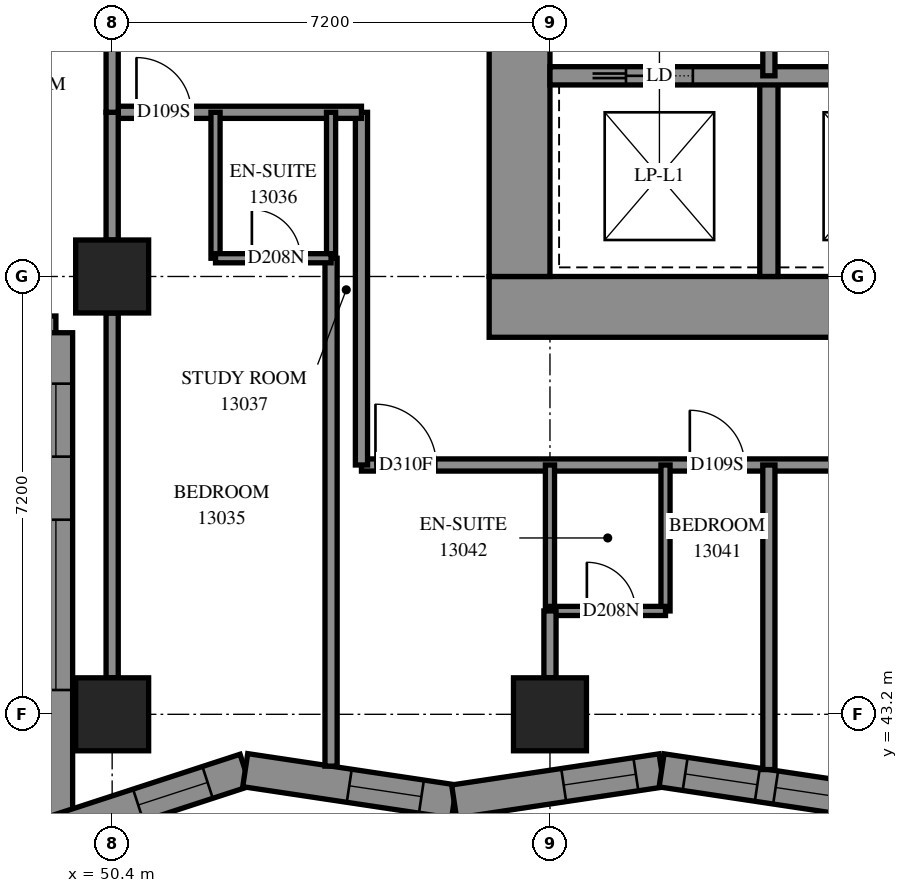
"""IFC4 building model, lengths in metres.
Left out: names, types, materials, properties, quantities, classifications, styles, units other than length and angle.
Written with IfcOpenShell. Run it as: python <this file> out.ifc"""

import sys

from ifc_helpers import new_model, si_unit, direction, frame, frame_2d, origin, origin_2d, place, context, subcontext, project, spatial, polyline, rectangle, outline, extrude, element, fill, save


model = new_model("IFC4")
c1 = context("Model", 3, precision=1e-05, world=origin(), true_north=direction((0.0, 1.0)))
c2 = subcontext(c1, "Body", "Model", "MODEL_VIEW")
j1 = project(units=[si_unit("LENGTHUNIT", "METRE"), si_unit("PLANEANGLEUNIT", "RADIAN")], contexts=[c1])
p1 = place(None, origin())
s1 = spatial("IfcSite", under=j1, at=p1, CompositionType="ELEMENT")
p2 = place(p1, origin())
s2 = spatial("IfcBuilding", under=s1, at=p2, CompositionType="ELEMENT")
p3 = place(p2, frame((0.0, 0.0, 50.8)))
s3 = spatial("IfcBuildingStorey", under=s2, at=p3, CompositionType="ELEMENT", Elevation=50.8)
for number, where, z_axis, x_axis in (
    (1, (50.4, 43.2, 0.0), (0.0, 0.0, 1.0), (1.0, 0.0, 0.0)),
    (2, (50.4, 50.4, 0.0), (0.0, 0.0, 1.0), (1.0, 0.0, 0.0)),
    (3, (57.6, 43.2, 0.0), (0.0, 0.0, 1.0), (1.0, 0.0, 0.0)),
):
    element("IfcColumn", number, at=place(p3, frame(where, z_axis=z_axis, x_axis=x_axis)), inside=s3, PredefinedType="COLUMN", context=c2, shape_type="SweptSolid", body=[
        extrude(rectangle(XDim=1.2, YDim=1.2, at=origin_2d()), origin(), (0.0, 0.0, 1.0), 3.1),
    ])
p4 = place(p3, frame((56.6, 49.9, -0.3), z_axis=(0.0, 0.0, 1.0), x_axis=(1.0, 0.0, 0.0)))
e4 = element("IfcWall", 4, at=p4, inside=s3, PredefinedType="SHEAR", context=c2, shape_type="SweptSolid", body=[
    extrude(rectangle(XDim=16.4, YDim=1.0, at=frame_2d((8.2, 0.0))), origin(), (0.0, 0.0, 1.0), 2.7),
])
p5 = place(p3, frame((57.1, 50.4, -0.3), z_axis=(0.0, 0.0, 1.0), x_axis=(0.0, 1.0, 0.0)))
e5 = element("IfcWall", 5, at=p5, inside=s3, PredefinedType="SHEAR", context=c2, shape_type="SweptSolid", body=[
    extrude(rectangle(XDim=14.4, YDim=1.0, at=frame_2d((7.2, 0.0))), origin(), (0.0, 0.0, 1.0), 2.7),
])
p6 = place(p5, frame((4.55, 0.0, 0.3)))
e6 = element("IfcOpeningElement", 6, at=p6, cuts=e5, PredefinedType="OPENING", context=c2, shape_type="SweptSolid", body=[
    extrude(rectangle(XDim=1.1, YDim=2.1, at=frame_2d((0.55, 1.05))), frame((0.0, 0.51, 0.0), z_axis=(0.0, -1.0, 0.0), x_axis=(1.0, 0.0, 0.0)), (0.0, 0.0, 1.0), 1.02),
])
p7 = place(p5, frame((11.35, 0.0, 0.3)))
e7 = element("IfcOpeningElement", 7, at=p7, cuts=e5, PredefinedType="OPENING", context=c2, shape_type="SweptSolid", body=[
    extrude(rectangle(XDim=1.1, YDim=2.1, at=frame_2d((0.55, 1.05))), frame((0.0, 0.51, 0.0), z_axis=(0.0, -1.0, 0.0), x_axis=(1.0, 0.0, 0.0)), (0.0, 0.0, 1.0), 1.02),
])
p8 = place(p3, frame((61.2, 50.4, 0.0), z_axis=(0.0, 0.0, 1.0), x_axis=(0.0, 1.0, 0.0)))
e8 = element("IfcWall", 8, at=p8, inside=s3, PredefinedType="SOLIDWALL", context=c2, shape_type="SweptSolid", body=[
    extrude(rectangle(XDim=3.3, YDim=0.3, at=frame_2d((1.65, 0.0))), origin(), (0.0, 0.0, 1.0), 3.1),
])
p9 = place(p3, frame((57.6, 53.7, 0.0), z_axis=(0.0, 0.0, 1.0), x_axis=(1.0, 0.0, 0.0)))
e9 = element("IfcWall", 9, at=p9, inside=s3, PredefinedType="SOLIDWALL", context=c2, shape_type="SweptSolid", body=[
    extrude(rectangle(XDim=14.4, YDim=0.3, at=frame_2d((7.2, 0.0))), origin(), (0.0, 0.0, 1.0), 3.1),
])
p10 = place(p9, frame((1.25, 0.0, 0.0)))
e10 = element("IfcOpeningElement", 10, at=p10, cuts=e9, PredefinedType="OPENING", context=c2, shape_type="SweptSolid", body=[
    extrude(rectangle(XDim=1.1, YDim=2.1, at=frame_2d((0.55, 1.05))), frame((0.0, 0.16, 0.0), z_axis=(0.0, -1.0, 0.0), x_axis=(1.0, 0.0, 0.0)), (0.0, 0.0, 1.0), 0.32),
])
p11 = place(p9, frame((4.85, 0.0, 0.0)))
e11 = element("IfcOpeningElement", 11, at=p11, cuts=e9, PredefinedType="OPENING", context=c2, shape_type="SweptSolid", body=[
    extrude(rectangle(XDim=1.1, YDim=2.1, at=frame_2d((0.55, 1.05))), frame((0.0, 0.16, 0.0), z_axis=(0.0, -1.0, 0.0), x_axis=(1.0, 0.0, 0.0)), (0.0, 0.0, 1.0), 0.32),
])
p12 = place(p9, frame((8.45, 0.0, 0.0)))
e12 = element("IfcOpeningElement", 12, at=p12, cuts=e9, PredefinedType="OPENING", context=c2, shape_type="SweptSolid", body=[
    extrude(rectangle(XDim=1.1, YDim=2.1, at=frame_2d((0.55, 1.05))), frame((0.0, 0.16, 0.0), z_axis=(0.0, -1.0, 0.0), x_axis=(1.0, 0.0, 0.0)), (0.0, 0.0, 1.0), 0.32),
])
p13 = place(p9, frame((12.05, 0.0, 0.0)))
e13 = element("IfcOpeningElement", 13, at=p13, cuts=e9, PredefinedType="OPENING", context=c2, shape_type="SweptSolid", body=[
    extrude(rectangle(XDim=1.1, YDim=2.1, at=frame_2d((0.55, 1.05))), frame((0.0, 0.16, 0.0), z_axis=(0.0, -1.0, 0.0), x_axis=(1.0, 0.0, 0.0)), (0.0, 0.0, 1.0), 0.32),
])
p14 = place(p3, frame((42.275, 49.475, 0.0), z_axis=(0.0, 0.0, 1.0), x_axis=(1.0, 0.0, 0.0)))
e14 = element("IfcWall", 14, at=p14, inside=s3, PredefinedType="SOLIDWALL", context=c2, shape_type="SweptSolid", body=[
    extrude(outline(polyline([(-0.275, -0.275), (6.925, -0.275), (7.475, 0.275), (0.275, 0.275), (-0.275, -0.275)])), origin(), (0.0, 0.0, 1.0), 3.1),
])
p15 = place(p14, frame((1.325, 0.0, 0.5)))
e15 = element("IfcOpeningElement", 15, at=p15, cuts=e14, PredefinedType="OPENING", context=c2, shape_type="SweptSolid", body=[
    extrude(rectangle(XDim=2.8, YDim=2.45, at=frame_2d((1.4, 1.225))), frame((0.0, 0.285, 0.0), z_axis=(0.0, -1.0, 0.0), x_axis=(1.0, 0.0, 0.0)), (0.0, 0.0, 1.0), 0.57),
])
p16 = place(p14, frame((5.162, 0.0, 0.5)))
e16 = element("IfcOpeningElement", 16, at=p16, cuts=e14, PredefinedType="OPENING", context=c2, shape_type="SweptSolid", body=[
    extrude(rectangle(XDim=1.2, YDim=2.45, at=frame_2d((0.6, 1.225))), frame((0.0, 0.285, 0.0), z_axis=(0.0, -1.0, 0.0), x_axis=(1.0, 0.0, 0.0)), (0.0, 0.0, 1.0), 0.57),
])
p17 = place(p3, frame((49.475, 49.475, 0.0), z_axis=(0.0, 0.0, 1.0), x_axis=(0.0, -1.0, 0.0)))
e17 = element("IfcWall", 17, at=p17, inside=s3, PredefinedType="SOLIDWALL", context=c2, shape_type="SweptSolid", body=[
    extrude(outline(polyline([(0.275, -0.275), (8.587, -0.275), (7.829, 0.275), (-0.275, 0.275), (0.275, -0.275)])), origin(), (0.0, 0.0, 1.0), 3.1),
])
p18 = place(p17, frame((3.075, 0.0, 0.5)))
e18 = element("IfcOpeningElement", 18, at=p18, cuts=e17, PredefinedType="OPENING", context=c2, shape_type="SweptSolid", body=[
    extrude(rectangle(XDim=2.8, YDim=2.45, at=frame_2d((1.4, 1.225))), frame((0.0, 0.285, 0.0), z_axis=(0.0, -1.0, 0.0), x_axis=(1.0, 0.0, 0.0)), (0.0, 0.0, 1.0), 0.57),
])
p19 = place(p17, frame((0.838, 0.0, 0.5)))
e19 = element("IfcOpeningElement", 19, at=p19, cuts=e17, PredefinedType="OPENING", context=c2, shape_type="SweptSolid", body=[
    extrude(rectangle(XDim=1.2, YDim=2.45, at=frame_2d((0.6, 1.225))), frame((0.0, 0.285, 0.0), z_axis=(0.0, -1.0, 0.0), x_axis=(1.0, 0.0, 0.0)), (0.0, 0.0, 1.0), 0.57),
])
p20 = place(p3, frame((49.475, 41.267, 0.0), z_axis=(0.0, 0.0, 1.0), x_axis=(0.9507812873, 0.3098627821, 0.0)))
e20 = element("IfcWall", 20, at=p20, inside=s3, PredefinedType="SOLIDWALL", context=c2, shape_type="SweptSolid", body=[
    extrude(outline(polyline([(-0.379, -0.275), (3.21, -0.275), (3.34, 0.275), (0.379, 0.275), (-0.379, -0.275)])), origin(), (0.0, 0.0, 1.0), 3.1),
])
p21 = place(p20, frame((1.424, 0.0, 0.5)))
e21 = element("IfcOpeningElement", 21, at=p21, cuts=e20, PredefinedType="OPENING", context=c2, shape_type="SweptSolid", body=[
    extrude(rectangle(XDim=1.2, YDim=2.45, at=frame_2d((0.6, 1.225))), frame((0.0, 0.285, 0.0), z_axis=(0.0, -1.0, 0.0), x_axis=(1.0, 0.0, 0.0)), (0.0, 0.0, 1.0), 0.57),
])
p22 = place(p3, frame((52.589, 42.282, 0.0), z_axis=(0.0, 0.0, 1.0), x_axis=(0.9889276939, -0.1483981679, 0.0)))
e22 = element("IfcWall", 22, at=p22, inside=s3, PredefinedType="SOLIDWALL", context=c2, shape_type="SweptSolid", body=[
    extrude(outline(polyline([(0.065, -0.275), (3.515, -0.275), (3.433, 0.275), (-0.065, 0.275), (0.065, -0.275)])), origin(), (0.0, 0.0, 1.0), 3.1),
])
p23 = place(p22, frame((1.73, 0.0, 0.5)))
e23 = element("IfcOpeningElement", 23, at=p23, cuts=e22, PredefinedType="OPENING", context=c2, shape_type="SweptSolid", body=[
    extrude(rectangle(XDim=1.2, YDim=2.45, at=frame_2d((0.6, 1.225))), frame((0.0, 0.285, 0.0), z_axis=(0.0, -1.0, 0.0), x_axis=(1.0, 0.0, 0.0)), (0.0, 0.0, 1.0), 0.57),
])
p24 = place(p3, frame((56.024, 41.766, 0.0), z_axis=(0.0, 0.0, 1.0), x_axis=(0.9889272091, 0.1484013984, 0.0)))
e24 = element("IfcWall", 24, at=p24, inside=s3, PredefinedType="SOLIDWALL", context=c2, shape_type="SweptSolid", body=[
    extrude(outline(polyline([(-0.041, -0.275), (3.409, -0.275), (3.491, 0.275), (0.041, 0.275), (-0.041, -0.275)])), origin(), (0.0, 0.0, 1.0), 3.1),
])
p25 = place(p24, frame((1.822, 0.0, 0.5)))
e25 = element("IfcOpeningElement", 25, at=p25, cuts=e24, PredefinedType="OPENING", context=c2, shape_type="SweptSolid", body=[
    extrude(rectangle(XDim=1.2, YDim=2.45, at=frame_2d((0.6, 1.225))), frame((0.0, 0.285, 0.0), z_axis=(0.0, -1.0, 0.0), x_axis=(1.0, 0.0, 0.0)), (0.0, 0.0, 1.0), 0.57),
])
p26 = place(p3, frame((59.436, 42.278, 0.0), z_axis=(0.0, 0.0, 1.0), x_axis=(0.9889272091, -0.1484013984, 0.0)))
e26 = element("IfcWall", 26, at=p26, inside=s3, PredefinedType="SOLIDWALL", context=c2, shape_type="SweptSolid", body=[
    extrude(outline(polyline([(0.041, -0.275), (3.491, -0.275), (3.409, 0.275), (-0.041, 0.275), (0.041, -0.275)])), origin(), (0.0, 0.0, 1.0), 3.1),
])
p27 = place(p26, frame((0.392, 0.0, 0.5)))
e27 = element("IfcOpeningElement", 27, at=p27, cuts=e26, PredefinedType="OPENING", context=c2, shape_type="SweptSolid", body=[
    extrude(rectangle(XDim=1.2, YDim=2.45, at=frame_2d((0.6, 1.225))), frame((0.0, 0.285, 0.0), z_axis=(0.0, -1.0, 0.0), x_axis=(1.0, 0.0, 0.0)), (0.0, 0.0, 1.0), 0.57),
])
p28 = place(p26, frame((1.896, 0.0, 0.5)))
e28 = element("IfcOpeningElement", 28, at=p28, cuts=e26, PredefinedType="OPENING", context=c2, shape_type="SweptSolid", body=[
    extrude(rectangle(XDim=1.2, YDim=2.45, at=frame_2d((0.6, 1.225))), frame((0.0, 0.285, 0.0), z_axis=(0.0, -1.0, 0.0), x_axis=(1.0, 0.0, 0.0)), (0.0, 0.0, 1.0), 0.57),
])
p29 = place(p3, frame((61.2, 53.7, 0.0), z_axis=(0.0, 0.0, 1.0), x_axis=(0.0, 1.0, 0.0)))
e29 = element("IfcWall", 29, at=p29, inside=s3, PredefinedType="PARTITIONING", context=c2, shape_type="SweptSolid", body=[
    extrude(rectangle(XDim=3.6, YDim=0.2, at=frame_2d((1.8, 0.0))), origin(), (0.0, 0.0, 1.0), 3.1),
])
p30 = place(p3, frame((54.5, 47.3, 0.0), z_axis=(0.0, 0.0, 1.0), x_axis=(1.0, 0.0, 0.0)))
e30 = element("IfcWall", 30, at=p30, inside=s3, PredefinedType="PARTITIONING", context=c2, shape_type="SweptSolid", body=[
    extrude(rectangle(XDim=19.56, YDim=0.2, at=frame_2d((9.78, 0.0))), origin(), (0.0, 0.0, 1.0), 3.1),
])
p31 = place(p30, frame((0.23, 0.0, 0.0)))
e31 = element("IfcOpeningElement", 31, at=p31, cuts=e30, PredefinedType="OPENING", context=c2, shape_type="SweptSolid", body=[
    extrude(rectangle(XDim=1.0, YDim=2.1, at=frame_2d((0.5, 1.05))), frame((0.0, 0.11, 0.0), z_axis=(0.0, -1.0, 0.0), x_axis=(1.0, 0.0, 0.0)), (0.0, 0.0, 1.0), 0.22),
])
p32 = place(p30, frame((5.4, 0.0, 0.0)))
e32 = element("IfcOpeningElement", 32, at=p32, cuts=e30, PredefinedType="OPENING", context=c2, shape_type="SweptSolid", body=[
    extrude(rectangle(XDim=0.9, YDim=2.1, at=frame_2d((0.45, 1.05))), frame((0.0, 0.11, 0.0), z_axis=(0.0, -1.0, 0.0), x_axis=(1.0, 0.0, 0.0)), (0.0, 0.0, 1.0), 0.22),
])
p33 = place(p30, frame((9.001, 0.0, 0.0)))
e33 = element("IfcOpeningElement", 33, at=p33, cuts=e30, PredefinedType="OPENING", context=c2, shape_type="SweptSolid", body=[
    extrude(rectangle(XDim=0.9, YDim=2.1, at=frame_2d((0.45, 1.05))), frame((0.0, 0.11, 0.0), z_axis=(0.0, -1.0, 0.0), x_axis=(1.0, 0.0, 0.0)), (0.0, 0.0, 1.0), 0.22),
])
p34 = place(p30, frame((14.3, 0.0, 0.0)))
e34 = element("IfcOpeningElement", 34, at=p34, cuts=e30, PredefinedType="OPENING", context=c2, shape_type="SweptSolid", body=[
    extrude(rectangle(XDim=0.9, YDim=2.1, at=frame_2d((0.45, 1.05))), frame((0.0, 0.11, 0.0), z_axis=(0.0, -1.0, 0.0), x_axis=(1.0, 0.0, 0.0)), (0.0, 0.0, 1.0), 0.22),
])
p35 = place(p3, frame((54.0, 42.348, 0.0), z_axis=(0.0, 0.0, 1.0), x_axis=(0.0, 1.0, 0.0)))
e35 = element("IfcWall", 35, at=p35, inside=s3, PredefinedType="PARTITIONING", context=c2, shape_type="SweptSolid", body=[
    extrude(rectangle(XDim=8.352, YDim=0.2, at=frame_2d((4.176, 0.0))), origin(), (0.0, 0.0, 1.0), 3.1),
])
p36 = place(p3, frame((50.4, 43.8, 0.0), z_axis=(0.0, 0.0, 1.0), x_axis=(0.0, 1.0, 0.0)))
e36 = element("IfcWall", 36, at=p36, inside=s3, PredefinedType="PARTITIONING", context=c2, shape_type="SweptSolid", body=[
    extrude(rectangle(XDim=6.0, YDim=0.2, at=frame_2d((3.0, 0.0))), origin(), (0.0, 0.0, 1.0), 2.6),
])
p37 = place(p3, frame((54.5, 47.3, 0.0), z_axis=(0.0, 0.0, 1.0), x_axis=(0.0, 1.0, 0.0)))
e37 = element("IfcWall", 37, at=p37, inside=s3, PredefinedType="PARTITIONING", context=c2, shape_type="SweptSolid", body=[
    extrude(rectangle(XDim=5.8, YDim=0.2, at=frame_2d((2.9, 0.0))), origin(), (0.0, 0.0, 1.0), 3.1),
])
p38 = place(p3, frame((61.2, 42.291, 0.0), z_axis=(0.0, 0.0, 1.0), x_axis=(0.0, 1.0, 0.0)))
e38 = element("IfcWall", 38, at=p38, inside=s3, PredefinedType="PARTITIONING", context=c2, shape_type="SweptSolid", body=[
    extrude(rectangle(XDim=5.009, YDim=0.2, at=frame_2d((2.504, 0.0))), origin(), (0.0, 0.0, 1.0), 3.1),
])
p39 = place(p3, frame((50.4, 53.1, 0.0), z_axis=(0.0, 0.0, 1.0), x_axis=(1.0, 0.0, 0.0)))
e39 = element("IfcWall", 39, at=p39, inside=s3, PredefinedType="PARTITIONING", context=c2, shape_type="SweptSolid", body=[
    extrude(rectangle(XDim=4.1, YDim=0.2, at=frame_2d((2.05, 0.0))), origin(), (0.0, 0.0, 1.0), 3.1),
])
p40 = place(p39, frame((0.4, 0.0, 0.0)))
e40 = element("IfcOpeningElement", 40, at=p40, cuts=e39, PredefinedType="OPENING", context=c2, shape_type="SweptSolid", body=[
    extrude(rectangle(XDim=0.9, YDim=2.1, at=frame_2d((0.45, 1.05))), frame((0.0, 0.11, 0.0), z_axis=(0.0, -1.0, 0.0), x_axis=(1.0, 0.0, 0.0)), (0.0, 0.0, 1.0), 0.22),
])
for number, where, z_axis, x_axis in (
    (41, (52.1, 50.7, 0.0), (0.0, 0.0, 1.0), (0.0, 1.0, 0.0)),
    (42, (54.0, 50.7, 0.0), (0.0, 0.0, 1.0), (0.0, 1.0, 0.0)),
    (43, (59.5, 44.9, 0.0), (0.0, 0.0, 1.0), (0.0, 1.0, 0.0)),
    (44, (57.6, 44.9, 0.0), (0.0, 0.0, 1.0), (0.0, 1.0, 0.0)),
):
    element("IfcWall", number, at=place(p3, frame(where, z_axis=z_axis, x_axis=x_axis)), inside=s3, PredefinedType="PARTITIONING", context=c2, shape_type="SweptSolid", body=[
        extrude(rectangle(XDim=2.4, YDim=0.15, at=frame_2d((1.2, 0.0))), origin(), (0.0, 0.0, 1.0), 3.1),
    ])
p41 = place(p3, frame((50.4, 51.0, 0.0), z_axis=(0.0, 0.0, 1.0), x_axis=(0.0, 1.0, 0.0)))
e45 = element("IfcWall", 45, at=p41, inside=s3, PredefinedType="PARTITIONING", context=c2, shape_type="SweptSolid", body=[
    extrude(rectangle(XDim=2.1, YDim=0.2, at=frame_2d((1.05, 0.0))), origin(), (0.0, 0.0, 1.0), 3.1),
])
p42 = place(p3, frame((52.1, 50.7, 0.0), z_axis=(0.0, 0.0, 1.0), x_axis=(1.0, 0.0, 0.0)))
e46 = element("IfcWall", 46, at=p42, inside=s3, PredefinedType="PARTITIONING", context=c2, shape_type="SweptSolid", body=[
    extrude(rectangle(XDim=1.9, YDim=0.15, at=frame_2d((0.95, 0.0))), origin(), (0.0, 0.0, 1.0), 3.1),
])
p43 = place(p42, frame((0.598, 0.0, 0.0)))
e47 = element("IfcOpeningElement", 47, at=p43, cuts=e46, PredefinedType="OPENING", context=c2, shape_type="SweptSolid", body=[
    extrude(rectangle(XDim=0.8, YDim=2.1, at=frame_2d((0.4, 1.05))), frame((0.0, 0.085, 0.0), z_axis=(0.0, -1.0, 0.0), x_axis=(1.0, 0.0, 0.0)), (0.0, 0.0, 1.0), 0.17),
])
p44 = place(p3, frame((57.6, 44.9, 0.0), z_axis=(0.0, 0.0, 1.0), x_axis=(1.0, 0.0, 0.0)))
e48 = element("IfcWall", 48, at=p44, inside=s3, PredefinedType="PARTITIONING", context=c2, shape_type="SweptSolid", body=[
    extrude(rectangle(XDim=1.9, YDim=0.15, at=frame_2d((0.95, 0.0))), origin(), (0.0, 0.0, 1.0), 3.1),
])
p45 = place(p44, frame((0.607, 0.0, 0.0)))
e49 = element("IfcOpeningElement", 49, at=p45, cuts=e48, PredefinedType="OPENING", context=c2, shape_type="SweptSolid", body=[
    extrude(rectangle(XDim=0.8, YDim=2.1, at=frame_2d((0.4, 1.05))), frame((0.0, 0.085, 0.0), z_axis=(0.0, -1.0, 0.0), x_axis=(1.0, 0.0, 0.0)), (0.0, 0.0, 1.0), 0.17),
])
p46 = place(p3, frame((50.4, 53.1, 0.0), z_axis=(0.0, 0.0, 1.0), x_axis=(0.0, 1.0, 0.0)))
e50 = element("IfcWall", 50, at=p46, inside=s3, PredefinedType="PARTITIONING", context=c2, shape_type="SweptSolid", body=[
    extrude(rectangle(XDim=1.8, YDim=0.2, at=frame_2d((0.9, 0.0))), origin(), (0.0, 0.0, 1.0), 3.1),
])
p47 = place(p3, frame((57.6, 43.8, 0.0), z_axis=(0.0, 0.0, 1.0), x_axis=(0.0, 1.0, 0.0)))
e51 = element("IfcWall", 51, at=p47, inside=s3, PredefinedType="PARTITIONING", context=c2, shape_type="SweptSolid", body=[
    extrude(rectangle(XDim=1.1, YDim=0.2, at=frame_2d((0.55, 0.0))), origin(), (0.0, 0.0, 1.0), 3.1),
])
p48 = place(p18, origin())
e52 = element("IfcWindow", 52, at=p48, inside=s3, PartitioningType="SINGLE_PANEL", PredefinedType="WINDOW", context=c2, shape_type="SweptSolid", body=[
    extrude(rectangle(XDim=2.8, YDim=2.45, at=frame_2d((1.4, 1.225))), frame((0.0, 0.155, 0.0), z_axis=(0.0, -1.0, 0.0), x_axis=(1.0, 0.0, 0.0)), (0.0, 0.0, 1.0), 0.06),
])
fill(e18, e52)
p49 = place(p19, origin())
e53 = element("IfcWindow", 53, at=p49, inside=s3, PartitioningType="SINGLE_PANEL", PredefinedType="WINDOW", context=c2, shape_type="SweptSolid", body=[
    extrude(rectangle(XDim=1.2, YDim=2.45, at=frame_2d((0.6, 1.225))), frame((0.0, 0.155, 0.0), z_axis=(0.0, -1.0, 0.0), x_axis=(1.0, 0.0, 0.0)), (0.0, 0.0, 1.0), 0.06),
])
fill(e19, e53)
p50 = place(p21, origin())
e54 = element("IfcWindow", 54, at=p50, inside=s3, PartitioningType="SINGLE_PANEL", PredefinedType="WINDOW", context=c2, shape_type="SweptSolid", body=[
    extrude(rectangle(XDim=1.2, YDim=2.45, at=frame_2d((0.6, 1.225))), frame((0.0, 0.155, 0.0), z_axis=(0.0, -1.0, 0.0), x_axis=(1.0, 0.0, 0.0)), (0.0, 0.0, 1.0), 0.06),
])
fill(e21, e54)
p51 = place(p23, origin())
e55 = element("IfcWindow", 55, at=p51, inside=s3, PartitioningType="SINGLE_PANEL", PredefinedType="WINDOW", context=c2, shape_type="SweptSolid", body=[
    extrude(rectangle(XDim=1.2, YDim=2.45, at=frame_2d((0.6, 1.225))), frame((0.0, 0.155, 0.0), z_axis=(0.0, -1.0, 0.0), x_axis=(1.0, 0.0, 0.0)), (0.0, 0.0, 1.0), 0.06),
])
fill(e23, e55)
p52 = place(p25, origin())
e56 = element("IfcWindow", 56, at=p52, inside=s3, PartitioningType="SINGLE_PANEL", PredefinedType="WINDOW", context=c2, shape_type="SweptSolid", body=[
    extrude(rectangle(XDim=1.2, YDim=2.45, at=frame_2d((0.6, 1.225))), frame((0.0, 0.155, 0.0), z_axis=(0.0, -1.0, 0.0), x_axis=(1.0, 0.0, 0.0)), (0.0, 0.0, 1.0), 0.06),
])
fill(e25, e56)
p53 = place(p27, origin())
e57 = element("IfcWindow", 57, at=p53, inside=s3, PartitioningType="SINGLE_PANEL", PredefinedType="WINDOW", context=c2, shape_type="SweptSolid", body=[
    extrude(rectangle(XDim=1.2, YDim=2.45, at=frame_2d((0.6, 1.225))), frame((0.0, 0.155, 0.0), z_axis=(0.0, -1.0, 0.0), x_axis=(1.0, 0.0, 0.0)), (0.0, 0.0, 1.0), 0.06),
])
fill(e27, e57)
p54 = place(p28, origin())
e58 = element("IfcWindow", 58, at=p54, inside=s3, PartitioningType="SINGLE_PANEL", PredefinedType="WINDOW", context=c2, shape_type="SweptSolid", body=[
    extrude(rectangle(XDim=1.2, YDim=2.45, at=frame_2d((0.6, 1.225))), frame((0.0, 0.155, 0.0), z_axis=(0.0, -1.0, 0.0), x_axis=(1.0, 0.0, 0.0)), (0.0, 0.0, 1.0), 0.06),
])
fill(e28, e58)
p55 = place(p10, origin())
e59 = element("IfcDoor", 59, at=p55, inside=s3, OperationType="SLIDING_TO_LEFT", PredefinedType="DOOR", context=c2, shape_type="SweptSolid", body=[
    extrude(rectangle(XDim=1.1, YDim=2.1, at=frame_2d((0.55, 1.05))), frame((0.0, 0.025, 0.0), z_axis=(0.0, -1.0, 0.0), x_axis=(1.0, 0.0, 0.0)), (0.0, 0.0, 1.0), 0.05),
])
fill(e10, e59)
p56 = place(p40, origin())
e60 = element("IfcDoor", 60, at=p56, inside=s3, OperationType="SINGLE_SWING_LEFT", PredefinedType="DOOR", context=c2, shape_type="SweptSolid", body=[
    extrude(rectangle(XDim=0.9, YDim=2.1, at=frame_2d((0.45, 1.05))), frame((0.0, 0.025, 0.0), z_axis=(0.0, -1.0, 0.0), x_axis=(1.0, 0.0, 0.0)), (0.0, 0.0, 1.0), 0.05),
])
fill(e40, e60)
p57 = place(p43, origin())
e61 = element("IfcDoor", 61, at=p57, inside=s3, OperationType="SINGLE_SWING_RIGHT", PredefinedType="DOOR", context=c2, shape_type="SweptSolid", body=[
    extrude(rectangle(XDim=0.8, YDim=2.1, at=frame_2d((0.4, 1.05))), frame((0.0, 0.025, 0.0), z_axis=(0.0, -1.0, 0.0), x_axis=(1.0, 0.0, 0.0)), (0.0, 0.0, 1.0), 0.05),
])
fill(e47, e61)
p58 = place(p31, origin())
e62 = element("IfcDoor", 62, at=p58, inside=s3, OperationType="SINGLE_SWING_RIGHT", PredefinedType="DOOR", context=c2, shape_type="SweptSolid", body=[
    extrude(rectangle(XDim=1.0, YDim=2.1, at=frame_2d((0.5, 1.05))), frame((0.0, 0.025, 0.0), z_axis=(0.0, -1.0, 0.0), x_axis=(1.0, 0.0, 0.0)), (0.0, 0.0, 1.0), 0.05),
])
fill(e31, e62)
p59 = place(p32, origin())
e63 = element("IfcDoor", 63, at=p59, inside=s3, OperationType="SINGLE_SWING_LEFT", PredefinedType="DOOR", context=c2, shape_type="SweptSolid", body=[
    extrude(rectangle(XDim=0.9, YDim=2.1, at=frame_2d((0.45, 1.05))), frame((0.0, 0.025, 0.0), z_axis=(0.0, -1.0, 0.0), x_axis=(1.0, 0.0, 0.0)), (0.0, 0.0, 1.0), 0.05),
])
fill(e32, e63)
p60 = place(p45, origin())
e64 = element("IfcDoor", 64, at=p60, inside=s3, OperationType="SINGLE_SWING_RIGHT", PredefinedType="DOOR", context=c2, shape_type="SweptSolid", body=[
    extrude(rectangle(XDim=0.8, YDim=2.1, at=frame_2d((0.4, 1.05))), frame((0.0, 0.025, 0.0), z_axis=(0.0, -1.0, 0.0), x_axis=(1.0, 0.0, 0.0)), (0.0, 0.0, 1.0), 0.05),
])
fill(e49, e64)
save(model, sys.argv[1])
